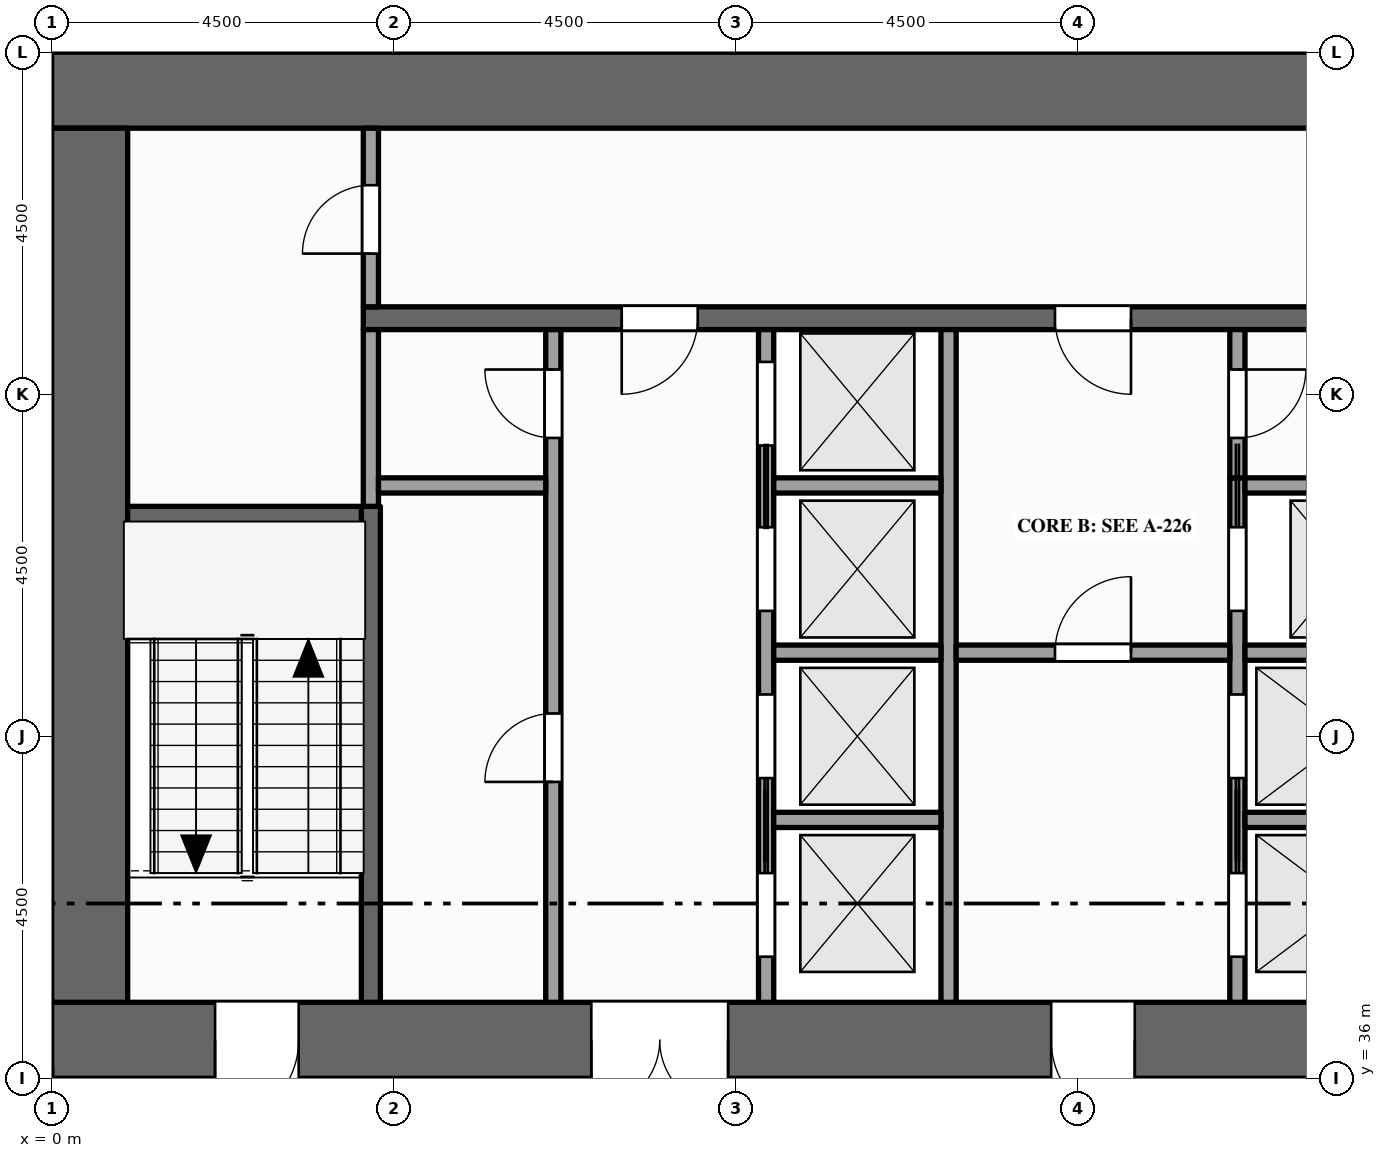
"""IFC4 building model, lengths in metres.
Left out: names, types, materials, properties, quantities, classifications, styles, units other than length and angle.
Written with IfcOpenShell. Run it as: python <this file> out.ifc"""

import sys

from ifc_helpers import new_model, si_unit, direction, frame, frame_2d, origin, place, context, subcontext, project, spatial, rectangle, extrude, element, fill, save


model = new_model("IFC4")
c1 = context("Model", 3, precision=1e-05, world=origin(), true_north=direction((0.0, 1.0)))
c2 = subcontext(c1, "Body", "Model", "MODEL_VIEW")
j1 = project(units=[si_unit("LENGTHUNIT", "METRE"), si_unit("PLANEANGLEUNIT", "RADIAN")], contexts=[c1])
p1 = place(None, origin())
s1 = spatial("IfcSite", under=j1, at=p1, CompositionType="ELEMENT")
p2 = place(p1, origin())
s2 = spatial("IfcBuilding", under=s1, at=p2, CompositionType="ELEMENT")
p3 = place(p2, frame((0.0, 0.0, 143.0)))
s3 = spatial("IfcBuildingStorey", under=s2, at=p3, CompositionType="ELEMENT", Elevation=143.0)
p4 = place(p3, frame((0.0, 36.5, -0.15), z_axis=(0.0, 0.0, 1.0), x_axis=(1.0, 0.0, 0.0)))
e1 = element("IfcWall", 1, at=p4, inside=s3, PredefinedType="SHEAR", context=c2, shape_type="SweptSolid", body=[
    extrude(rectangle(XDim=22.5, YDim=1.0, at=frame_2d((11.25, 0.0))), origin(), (0.0, 0.0, 1.0), 4.0),
])
p5 = place(p4, frame((7.1, 0.0, 0.15)))
e2 = element("IfcOpeningElement", 2, at=p5, cuts=e1, PredefinedType="OPENING", context=c2, shape_type="SweptSolid", body=[
    extrude(rectangle(XDim=1.8, YDim=2.1, at=frame_2d((0.9, 1.05))), frame((0.0, 0.51, 0.0), z_axis=(0.0, -1.0, 0.0), x_axis=(1.0, 0.0, 0.0)), (0.0, 0.0, 1.0), 1.02),
])
p6 = place(p4, frame((13.15, 0.0, 0.15)))
e3 = element("IfcOpeningElement", 3, at=p6, cuts=e1, PredefinedType="OPENING", context=c2, shape_type="SweptSolid", body=[
    extrude(rectangle(XDim=1.1, YDim=2.1, at=frame_2d((0.55, 1.05))), frame((0.0, 0.51, 0.0), z_axis=(0.0, -1.0, 0.0), x_axis=(1.0, 0.0, 0.0)), (0.0, 0.0, 1.0), 1.02),
])
p7 = place(p4, frame((2.15, 0.0, 0.15)))
e4 = element("IfcOpeningElement", 4, at=p7, cuts=e1, PredefinedType="OPENING", context=c2, shape_type="SweptSolid", body=[
    extrude(rectangle(XDim=1.1, YDim=2.1, at=frame_2d((0.55, 1.05))), frame((0.0, 0.51, 0.0), z_axis=(0.0, -1.0, 0.0), x_axis=(1.0, 0.0, 0.0)), (0.0, 0.0, 1.0), 1.02),
])
p8 = place(p4, frame((19.35, 0.0, 0.15)))
e5 = element("IfcOpeningElement", 5, at=p8, cuts=e1, PredefinedType="OPENING", context=c2, shape_type="SweptSolid", body=[
    extrude(rectangle(XDim=1.1, YDim=2.1, at=frame_2d((0.55, 1.05))), frame((0.0, 0.51, 0.0), z_axis=(0.0, -1.0, 0.0), x_axis=(1.0, 0.0, 0.0)), (0.0, 0.0, 1.0), 1.02),
])
p9 = place(p3, frame((0.0, 49.0, -0.15), z_axis=(0.0, 0.0, 1.0), x_axis=(1.0, 0.0, 0.0)))
e6 = element("IfcWall", 6, at=p9, inside=s3, PredefinedType="SHEAR", context=c2, shape_type="SweptSolid", body=[
    extrude(rectangle(XDim=22.5, YDim=1.0, at=frame_2d((11.25, 0.0))), origin(), (0.0, 0.0, 1.0), 4.0),
])
p10 = place(p3, frame((0.5, 37.0, -0.15), z_axis=(0.0, 0.0, 1.0), x_axis=(0.0, 1.0, 0.0)))
e7 = element("IfcWall", 7, at=p10, inside=s3, PredefinedType="SHEAR", context=c2, shape_type="SweptSolid", body=[
    extrude(rectangle(XDim=11.5, YDim=1.0, at=frame_2d((5.75, 0.0))), origin(), (0.0, 0.0, 1.0), 4.0),
])
p11 = place(p3, frame((0.0, 36.0, 0.0), z_axis=(0.0, 0.0, 1.0), x_axis=(-1.0, 0.0, 0.0)))
e8 = element("IfcWall", 8, at=p11, inside=s3, PredefinedType="STANDARD", context=c2, shape_type="SweptSolid", body=[
    extrude(rectangle(XDim=1.05, YDim=0.3, at=frame_2d((0.525, 0.0))), origin(), (0.0, 0.0, 1.0), 2.87),
])
p12 = place(p3, frame((4.2, 37.0, 0.0), z_axis=(0.0, 0.0, 1.0), x_axis=(0.0, 1.0, 0.0)))
e9 = element("IfcWall", 9, at=p12, inside=s3, PredefinedType="SHEAR", context=c2, shape_type="SweptSolid", body=[
    extrude(rectangle(XDim=6.525, YDim=0.25, at=frame_2d((3.262, 0.0))), origin(), (0.0, 0.0, 1.0), 3.85),
])
p13 = place(p3, frame((4.2, 43.525, 0.0), z_axis=(0.0, 0.0, 1.0), x_axis=(0.0, 1.0, 0.0)))
e10 = element("IfcWall", 10, at=p13, inside=s3, PredefinedType="PARTITIONING", context=c2, shape_type="SweptSolid", body=[
    extrude(rectangle(XDim=2.325, YDim=0.2, at=frame_2d((1.163, 0.0))), origin(), (0.0, 0.0, 1.0), 3.85),
])
p14 = place(p3, frame((4.2, 46.15, 0.0), z_axis=(0.0, 0.0, 1.0), x_axis=(0.0, 1.0, 0.0)))
e11 = element("IfcWall", 11, at=p14, inside=s3, PredefinedType="PARTITIONING", context=c2, shape_type="SweptSolid", body=[
    extrude(rectangle(XDim=2.35, YDim=0.2, at=frame_2d((1.175, 0.0))), origin(), (0.0, 0.0, 1.0), 3.85),
])
p15 = place(p14, frame((0.7, 0.0, 0.0)))
e12 = element("IfcOpeningElement", 12, at=p15, cuts=e11, PredefinedType="OPENING", context=c2, shape_type="SweptSolid", body=[
    extrude(rectangle(XDim=0.9, YDim=2.1, at=frame_2d((0.45, 1.05))), frame((0.0, 0.11, 0.0), z_axis=(0.0, -1.0, 0.0), x_axis=(1.0, 0.0, 0.0)), (0.0, 0.0, 1.0), 0.22),
])
p16 = place(p3, frame((6.6, 37.0, 0.0), z_axis=(0.0, 0.0, 1.0), x_axis=(0.0, 1.0, 0.0)))
e13 = element("IfcWall", 13, at=p16, inside=s3, PredefinedType="PARTITIONING", context=c2, shape_type="SweptSolid", body=[
    extrude(rectangle(XDim=8.85, YDim=0.2, at=frame_2d((4.425, 0.0))), origin(), (0.0, 0.0, 1.0), 3.85),
])
p17 = place(p16, frame((2.9, 0.0, 0.0)))
e14 = element("IfcOpeningElement", 14, at=p17, cuts=e13, PredefinedType="OPENING", context=c2, shape_type="SweptSolid", body=[
    extrude(rectangle(XDim=0.9, YDim=2.1, at=frame_2d((0.45, 1.05))), frame((0.0, 0.11, 0.0), z_axis=(0.0, -1.0, 0.0), x_axis=(1.0, 0.0, 0.0)), (0.0, 0.0, 1.0), 0.22),
])
p18 = place(p16, frame((7.425, 0.0, 0.0)))
e15 = element("IfcOpeningElement", 15, at=p18, cuts=e13, PredefinedType="OPENING", context=c2, shape_type="SweptSolid", body=[
    extrude(rectangle(XDim=0.9, YDim=2.1, at=frame_2d((0.45, 1.05))), frame((0.0, 0.11, 0.0), z_axis=(0.0, -1.0, 0.0), x_axis=(1.0, 0.0, 0.0)), (0.0, 0.0, 1.0), 0.22),
])
p19 = place(p3, frame((9.4, 37.0, 0.0), z_axis=(0.0, 0.0, 1.0), x_axis=(0.0, 1.0, 0.0)))
e16 = element("IfcWall", 16, at=p19, inside=s3, PredefinedType="SOLIDWALL", context=c2, shape_type="SweptSolid", body=[
    extrude(rectangle(XDim=8.85, YDim=0.2, at=frame_2d((4.425, 0.0))), origin(), (0.0, 0.0, 1.0), 3.85),
])
p20 = place(p19, frame((0.6, 0.0, 0.012)))
e17 = element("IfcOpeningElement", 17, at=p20, cuts=e16, PredefinedType="OPENING", context=c2, shape_type="SweptSolid", body=[
    extrude(rectangle(XDim=1.1, YDim=2.1, at=frame_2d((0.55, 1.05))), frame((0.0, 0.11, 0.0), z_axis=(0.0, -1.0, 0.0), x_axis=(1.0, 0.0, 0.0)), (0.0, 0.0, 1.0), 0.22),
])
p21 = place(p19, frame((2.95, 0.0, 0.012)))
e18 = element("IfcOpeningElement", 18, at=p21, cuts=e16, PredefinedType="OPENING", context=c2, shape_type="SweptSolid", body=[
    extrude(rectangle(XDim=1.1, YDim=2.1, at=frame_2d((0.55, 1.05))), frame((0.0, 0.11, 0.0), z_axis=(0.0, -1.0, 0.0), x_axis=(1.0, 0.0, 0.0)), (0.0, 0.0, 1.0), 0.22),
])
p22 = place(p19, frame((5.15, 0.0, 0.012)))
e19 = element("IfcOpeningElement", 19, at=p22, cuts=e16, PredefinedType="OPENING", context=c2, shape_type="SweptSolid", body=[
    extrude(rectangle(XDim=1.1, YDim=2.1, at=frame_2d((0.55, 1.05))), frame((0.0, 0.11, 0.0), z_axis=(0.0, -1.0, 0.0), x_axis=(1.0, 0.0, 0.0)), (0.0, 0.0, 1.0), 0.22),
])
p23 = place(p19, frame((7.325, 0.0, 0.012)))
e20 = element("IfcOpeningElement", 20, at=p23, cuts=e16, PredefinedType="OPENING", context=c2, shape_type="SweptSolid", body=[
    extrude(rectangle(XDim=1.1, YDim=2.1, at=frame_2d((0.55, 1.05))), frame((0.0, 0.11, 0.0), z_axis=(0.0, -1.0, 0.0), x_axis=(1.0, 0.0, 0.0)), (0.0, 0.0, 1.0), 0.22),
])
p24 = place(p3, frame((11.8, 37.0, 0.0), z_axis=(0.0, 0.0, 1.0), x_axis=(0.0, 1.0, 0.0)))
e21 = element("IfcWall", 21, at=p24, inside=s3, PredefinedType="SOLIDWALL", context=c2, shape_type="SweptSolid", body=[
    extrude(rectangle(XDim=8.85, YDim=0.2, at=frame_2d((4.425, 0.0))), origin(), (0.0, 0.0, 1.0), 3.85),
])
p25 = place(p3, frame((15.6, 37.0, 0.0), z_axis=(0.0, 0.0, 1.0), x_axis=(0.0, 1.0, 0.0)))
e22 = element("IfcWall", 22, at=p25, inside=s3, PredefinedType="SOLIDWALL", context=c2, shape_type="SweptSolid", body=[
    extrude(rectangle(XDim=6.9, YDim=0.2, at=frame_2d((3.45, 0.0))), origin(), (0.0, 0.0, 1.0), 3.85),
])
p26 = place(p25, frame((0.6, 0.0, 0.012)))
e23 = element("IfcOpeningElement", 23, at=p26, cuts=e22, PredefinedType="OPENING", context=c2, shape_type="SweptSolid", body=[
    extrude(rectangle(XDim=1.1, YDim=2.1, at=frame_2d((0.55, 1.05))), frame((0.0, 0.11, 0.0), z_axis=(0.0, -1.0, 0.0), x_axis=(1.0, 0.0, 0.0)), (0.0, 0.0, 1.0), 0.22),
])
p27 = place(p25, frame((2.95, 0.0, 0.012)))
e24 = element("IfcOpeningElement", 24, at=p27, cuts=e22, PredefinedType="OPENING", context=c2, shape_type="SweptSolid", body=[
    extrude(rectangle(XDim=1.1, YDim=2.1, at=frame_2d((0.55, 1.05))), frame((0.0, 0.11, 0.0), z_axis=(0.0, -1.0, 0.0), x_axis=(1.0, 0.0, 0.0)), (0.0, 0.0, 1.0), 0.22),
])
p28 = place(p25, frame((5.15, 0.0, 0.012)))
e25 = element("IfcOpeningElement", 25, at=p28, cuts=e22, PredefinedType="OPENING", context=c2, shape_type="SweptSolid", body=[
    extrude(rectangle(XDim=1.1, YDim=2.1, at=frame_2d((0.55, 1.05))), frame((0.0, 0.11, 0.0), z_axis=(0.0, -1.0, 0.0), x_axis=(1.0, 0.0, 0.0)), (0.0, 0.0, 1.0), 0.22),
])
p29 = place(p3, frame((15.6, 43.9, 0.0), z_axis=(0.0, 0.0, 1.0), x_axis=(0.0, 1.0, 0.0)))
e26 = element("IfcWall", 26, at=p29, inside=s3, PredefinedType="PARTITIONING", context=c2, shape_type="SweptSolid", body=[
    extrude(rectangle(XDim=1.95, YDim=0.2, at=frame_2d((0.975, 0.0))), origin(), (0.0, 0.0, 1.0), 3.85),
])
p30 = place(p29, frame((0.525, 0.0, 0.0)))
e27 = element("IfcOpeningElement", 27, at=p30, cuts=e26, PredefinedType="OPENING", context=c2, shape_type="SweptSolid", body=[
    extrude(rectangle(XDim=0.9, YDim=2.1, at=frame_2d((0.45, 1.05))), frame((0.0, 0.11, 0.0), z_axis=(0.0, -1.0, 0.0), x_axis=(1.0, 0.0, 0.0)), (0.0, 0.0, 1.0), 0.22),
])
p31 = place(p3, frame((9.5, 39.4, 0.0), z_axis=(0.0, 0.0, 1.0), x_axis=(1.0, 0.0, 0.0)))
e28 = element("IfcWall", 28, at=p31, inside=s3, PredefinedType="SOLIDWALL", context=c2, shape_type="SweptSolid", body=[
    extrude(rectangle(XDim=2.2, YDim=0.2, at=frame_2d((1.1, 0.0))), origin(), (0.0, 0.0, 1.0), 3.85),
])
p32 = place(p3, frame((15.7, 39.4, 0.0), z_axis=(0.0, 0.0, 1.0), x_axis=(1.0, 0.0, 0.0)))
e29 = element("IfcWall", 29, at=p32, inside=s3, PredefinedType="SOLIDWALL", context=c2, shape_type="SweptSolid", body=[
    extrude(rectangle(XDim=2.675, YDim=0.2, at=frame_2d((1.337, 0.0))), origin(), (0.0, 0.0, 1.0), 3.85),
])
p33 = place(p3, frame((9.5, 41.6, 0.0), z_axis=(0.0, 0.0, 1.0), x_axis=(1.0, 0.0, 0.0)))
e30 = element("IfcWall", 30, at=p33, inside=s3, PredefinedType="SOLIDWALL", context=c2, shape_type="SweptSolid", body=[
    extrude(rectangle(XDim=2.2, YDim=0.2, at=frame_2d((1.1, 0.0))), origin(), (0.0, 0.0, 1.0), 3.85),
])
p34 = place(p3, frame((11.9, 41.6, 0.0), z_axis=(0.0, 0.0, 1.0), x_axis=(1.0, 0.0, 0.0)))
e31 = element("IfcWall", 31, at=p34, inside=s3, PredefinedType="PARTITIONING", context=c2, shape_type="SweptSolid", body=[
    extrude(rectangle(XDim=3.6, YDim=0.2, at=frame_2d((1.8, 0.0))), origin(), (0.0, 0.0, 1.0), 3.85),
])
p35 = place(p34, frame((1.3, 0.0, 0.0)))
e32 = element("IfcOpeningElement", 32, at=p35, cuts=e31, PredefinedType="OPENING", context=c2, shape_type="SweptSolid", body=[
    extrude(rectangle(XDim=1.0, YDim=2.1, at=frame_2d((0.5, 1.05))), frame((0.0, 0.11, 0.0), z_axis=(0.0, -1.0, 0.0), x_axis=(1.0, 0.0, 0.0)), (0.0, 0.0, 1.0), 0.22),
])
p36 = place(p3, frame((15.7, 41.6, 0.0), z_axis=(0.0, 0.0, 1.0), x_axis=(1.0, 0.0, 0.0)))
e33 = element("IfcWall", 33, at=p36, inside=s3, PredefinedType="SOLIDWALL", context=c2, shape_type="SweptSolid", body=[
    extrude(rectangle(XDim=2.675, YDim=0.2, at=frame_2d((1.337, 0.0))), origin(), (0.0, 0.0, 1.0), 3.85),
])
p37 = place(p3, frame((1.0, 43.4, 0.0), z_axis=(0.0, 0.0, 1.0), x_axis=(1.0, 0.0, 0.0)))
e34 = element("IfcWall", 34, at=p37, inside=s3, PredefinedType="SHEAR", context=c2, shape_type="SweptSolid", body=[
    extrude(rectangle(XDim=3.075, YDim=0.25, at=frame_2d((1.538, 0.0))), origin(), (0.0, 0.0, 1.0), 3.85),
])
p38 = place(p3, frame((4.3, 43.8, 0.0), z_axis=(0.0, 0.0, 1.0), x_axis=(1.0, 0.0, 0.0)))
e35 = element("IfcWall", 35, at=p38, inside=s3, PredefinedType="PARTITIONING", context=c2, shape_type="SweptSolid", body=[
    extrude(rectangle(XDim=2.2, YDim=0.2, at=frame_2d((1.1, 0.0))), origin(), (0.0, 0.0, 1.0), 3.85),
])
p39 = place(p3, frame((9.5, 43.8, 0.0), z_axis=(0.0, 0.0, 1.0), x_axis=(1.0, 0.0, 0.0)))
e36 = element("IfcWall", 36, at=p39, inside=s3, PredefinedType="SOLIDWALL", context=c2, shape_type="SweptSolid", body=[
    extrude(rectangle(XDim=2.2, YDim=0.2, at=frame_2d((1.1, 0.0))), origin(), (0.0, 0.0, 1.0), 3.85),
])
p40 = place(p3, frame((15.7, 43.8, 0.0), z_axis=(0.0, 0.0, 1.0), x_axis=(1.0, 0.0, 0.0)))
e37 = element("IfcWall", 37, at=p40, inside=s3, PredefinedType="SOLIDWALL", context=c2, shape_type="SweptSolid", body=[
    extrude(rectangle(XDim=2.7, YDim=0.2, at=frame_2d((1.35, 0.0))), origin(), (0.0, 0.0, 1.0), 3.85),
])
p41 = place(p3, frame((4.1, 46.0, 0.0), z_axis=(0.0, 0.0, 1.0), x_axis=(1.0, 0.0, 0.0)))
e38 = element("IfcWall", 38, at=p41, inside=s3, PredefinedType="SHEAR", context=c2, shape_type="SweptSolid", body=[
    extrude(rectangle(XDim=14.5, YDim=0.3, at=frame_2d((7.25, 0.0))), origin(), (0.0, 0.0, 1.0), 3.85),
])
p42 = place(p41, frame((3.4, 0.0, 0.0)))
e39 = element("IfcOpeningElement", 39, at=p42, cuts=e38, PredefinedType="OPENING", context=c2, shape_type="SweptSolid", body=[
    extrude(rectangle(XDim=1.0, YDim=2.1, at=frame_2d((0.5, 1.05))), frame((0.0, 0.16, 0.0), z_axis=(0.0, -1.0, 0.0), x_axis=(1.0, 0.0, 0.0)), (0.0, 0.0, 1.0), 0.32),
])
p43 = place(p41, frame((9.1, 0.0, 0.0)))
e40 = element("IfcOpeningElement", 40, at=p43, cuts=e38, PredefinedType="OPENING", context=c2, shape_type="SweptSolid", body=[
    extrude(rectangle(XDim=1.0, YDim=2.1, at=frame_2d((0.5, 1.05))), frame((0.0, 0.16, 0.0), z_axis=(0.0, -1.0, 0.0), x_axis=(1.0, 0.0, 0.0)), (0.0, 0.0, 1.0), 0.32),
])
p44 = place(p20, origin())
e41 = element("IfcDoor", 41, at=p44, inside=s3, OperationType="SLIDING_TO_RIGHT", PredefinedType="DOOR", context=c2, shape_type="SweptSolid", body=[
    extrude(rectangle(XDim=1.1, YDim=2.1, at=frame_2d((0.55, 1.05))), frame((0.0, 0.025, 0.0), z_axis=(0.0, -1.0, 0.0), x_axis=(1.0, 0.0, 0.0)), (0.0, 0.0, 1.0), 0.05),
])
fill(e17, e41)
p45 = place(p21, origin())
e42 = element("IfcDoor", 42, at=p45, inside=s3, OperationType="SLIDING_TO_LEFT", PredefinedType="DOOR", context=c2, shape_type="SweptSolid", body=[
    extrude(rectangle(XDim=1.1, YDim=2.1, at=frame_2d((0.55, 1.05))), frame((0.0, 0.025, 0.0), z_axis=(0.0, -1.0, 0.0), x_axis=(1.0, 0.0, 0.0)), (0.0, 0.0, 1.0), 0.05),
])
fill(e18, e42)
p46 = place(p22, origin())
e43 = element("IfcDoor", 43, at=p46, inside=s3, OperationType="SLIDING_TO_RIGHT", PredefinedType="DOOR", context=c2, shape_type="SweptSolid", body=[
    extrude(rectangle(XDim=1.1, YDim=2.1, at=frame_2d((0.55, 1.05))), frame((0.0, 0.025, 0.0), z_axis=(0.0, -1.0, 0.0), x_axis=(1.0, 0.0, 0.0)), (0.0, 0.0, 1.0), 0.05),
])
fill(e19, e43)
p47 = place(p23, origin())
e44 = element("IfcDoor", 44, at=p47, inside=s3, OperationType="SLIDING_TO_LEFT", PredefinedType="DOOR", context=c2, shape_type="SweptSolid", body=[
    extrude(rectangle(XDim=1.1, YDim=2.1, at=frame_2d((0.55, 1.05))), frame((0.0, 0.025, 0.0), z_axis=(0.0, -1.0, 0.0), x_axis=(1.0, 0.0, 0.0)), (0.0, 0.0, 1.0), 0.05),
])
fill(e20, e44)
p48 = place(p26, origin())
e45 = element("IfcDoor", 45, at=p48, inside=s3, OperationType="SLIDING_TO_RIGHT", PredefinedType="DOOR", context=c2, shape_type="SweptSolid", body=[
    extrude(rectangle(XDim=1.1, YDim=2.1, at=frame_2d((0.55, 1.05))), frame((0.0, 0.025, 0.0), z_axis=(0.0, -1.0, 0.0), x_axis=(1.0, 0.0, 0.0)), (0.0, 0.0, 1.0), 0.05),
])
fill(e23, e45)
p49 = place(p27, origin())
e46 = element("IfcDoor", 46, at=p49, inside=s3, OperationType="SLIDING_TO_LEFT", PredefinedType="DOOR", context=c2, shape_type="SweptSolid", body=[
    extrude(rectangle(XDim=1.1, YDim=2.1, at=frame_2d((0.55, 1.05))), frame((0.0, 0.025, 0.0), z_axis=(0.0, -1.0, 0.0), x_axis=(1.0, 0.0, 0.0)), (0.0, 0.0, 1.0), 0.05),
])
fill(e24, e46)
p50 = place(p28, origin())
e47 = element("IfcDoor", 47, at=p50, inside=s3, OperationType="SLIDING_TO_RIGHT", PredefinedType="DOOR", context=c2, shape_type="SweptSolid", body=[
    extrude(rectangle(XDim=1.1, YDim=2.1, at=frame_2d((0.55, 1.05))), frame((0.0, 0.025, 0.0), z_axis=(0.0, -1.0, 0.0), x_axis=(1.0, 0.0, 0.0)), (0.0, 0.0, 1.0), 0.05),
])
fill(e25, e47)
p51 = place(p5, origin())
e48 = element("IfcDoor", 48, at=p51, inside=s3, OperationType="DOUBLE_DOOR_SINGLE_SWING", PredefinedType="DOOR", context=c2, shape_type="SweptSolid", body=[
    extrude(rectangle(XDim=1.8, YDim=2.1, at=frame_2d((0.9, 1.05))), frame((0.0, 0.025, 0.0), z_axis=(0.0, -1.0, 0.0), x_axis=(1.0, 0.0, 0.0)), (0.0, 0.0, 1.0), 0.05),
])
fill(e2, e48)
p52 = place(p42, origin())
e49 = element("IfcDoor", 49, at=p52, inside=s3, OperationType="SINGLE_SWING_LEFT", PredefinedType="DOOR", context=c2, shape_type="SweptSolid", body=[
    extrude(rectangle(XDim=1.0, YDim=2.1, at=frame_2d((0.5, 1.05))), frame((0.0, 0.025, 0.0), z_axis=(0.0, -1.0, 0.0), x_axis=(1.0, 0.0, 0.0)), (0.0, 0.0, 1.0), 0.05),
])
fill(e39, e49)
p53 = place(p6, origin())
e50 = element("IfcDoor", 50, at=p53, inside=s3, OperationType="SINGLE_SWING_RIGHT", PredefinedType="DOOR", context=c2, shape_type="SweptSolid", body=[
    extrude(rectangle(XDim=1.1, YDim=2.1, at=frame_2d((0.55, 1.05))), frame((0.0, 0.025, 0.0), z_axis=(0.0, -1.0, 0.0), x_axis=(1.0, 0.0, 0.0)), (0.0, 0.0, 1.0), 0.05),
])
fill(e3, e50)
p54 = place(p35, origin())
e51 = element("IfcDoor", 51, at=p54, inside=s3, OperationType="SINGLE_SWING_RIGHT", PredefinedType="DOOR", context=c2, shape_type="SweptSolid", body=[
    extrude(rectangle(XDim=1.0, YDim=2.1, at=frame_2d((0.5, 1.05))), frame((0.0, 0.025, 0.0), z_axis=(0.0, -1.0, 0.0), x_axis=(1.0, 0.0, 0.0)), (0.0, 0.0, 1.0), 0.05),
])
fill(e32, e51)
p55 = place(p43, origin())
e52 = element("IfcDoor", 52, at=p55, inside=s3, OperationType="SINGLE_SWING_RIGHT", PredefinedType="DOOR", context=c2, shape_type="SweptSolid", body=[
    extrude(rectangle(XDim=1.0, YDim=2.1, at=frame_2d((0.5, 1.05))), frame((0.0, 0.025, 0.0), z_axis=(0.0, -1.0, 0.0), x_axis=(1.0, 0.0, 0.0)), (0.0, 0.0, 1.0), 0.05),
])
fill(e40, e52)
p56 = place(p7, origin())
e53 = element("IfcDoor", 53, at=p56, inside=s3, OperationType="SINGLE_SWING_LEFT", PredefinedType="DOOR", context=c2, shape_type="SweptSolid", body=[
    extrude(rectangle(XDim=1.1, YDim=2.1, at=frame_2d((0.55, 1.05))), frame((0.0, 0.025, 0.0), z_axis=(0.0, -1.0, 0.0), x_axis=(1.0, 0.0, 0.0)), (0.0, 0.0, 1.0), 0.05),
])
fill(e4, e53)
p57 = place(p15, origin())
e54 = element("IfcDoor", 54, at=p57, inside=s3, OperationType="SINGLE_SWING_LEFT", PredefinedType="DOOR", context=c2, shape_type="SweptSolid", body=[
    extrude(rectangle(XDim=0.9, YDim=2.1, at=frame_2d((0.45, 1.05))), frame((0.0, 0.025, 0.0), z_axis=(0.0, -1.0, 0.0), x_axis=(1.0, 0.0, 0.0)), (0.0, 0.0, 1.0), 0.05),
])
fill(e12, e54)
p58 = place(p17, origin())
e55 = element("IfcDoor", 55, at=p58, inside=s3, OperationType="SINGLE_SWING_LEFT", PredefinedType="DOOR", context=c2, shape_type="SweptSolid", body=[
    extrude(rectangle(XDim=0.9, YDim=2.1, at=frame_2d((0.45, 1.05))), frame((0.0, 0.025, 0.0), z_axis=(0.0, -1.0, 0.0), x_axis=(1.0, 0.0, 0.0)), (0.0, 0.0, 1.0), 0.05),
])
fill(e14, e55)
p59 = place(p18, origin())
e56 = element("IfcDoor", 56, at=p59, inside=s3, OperationType="SINGLE_SWING_RIGHT", PredefinedType="DOOR", context=c2, shape_type="SweptSolid", body=[
    extrude(rectangle(XDim=0.9, YDim=2.1, at=frame_2d((0.45, 1.05))), frame((0.0, 0.025, 0.0), z_axis=(0.0, -1.0, 0.0), x_axis=(1.0, 0.0, 0.0)), (0.0, 0.0, 1.0), 0.05),
])
fill(e15, e56)
p60 = place(p30, origin())
e57 = element("IfcDoor", 57, at=p60, inside=s3, OperationType="SINGLE_SWING_RIGHT", PredefinedType="DOOR", context=c2, shape_type="SweptSolid", body=[
    extrude(rectangle(XDim=0.9, YDim=2.1, at=frame_2d((0.45, 1.05))), frame((0.0, 0.025, 0.0), z_axis=(0.0, -1.0, 0.0), x_axis=(1.0, 0.0, 0.0)), (0.0, 0.0, 1.0), 0.05),
])
fill(e27, e57)
save(model, sys.argv[1])
